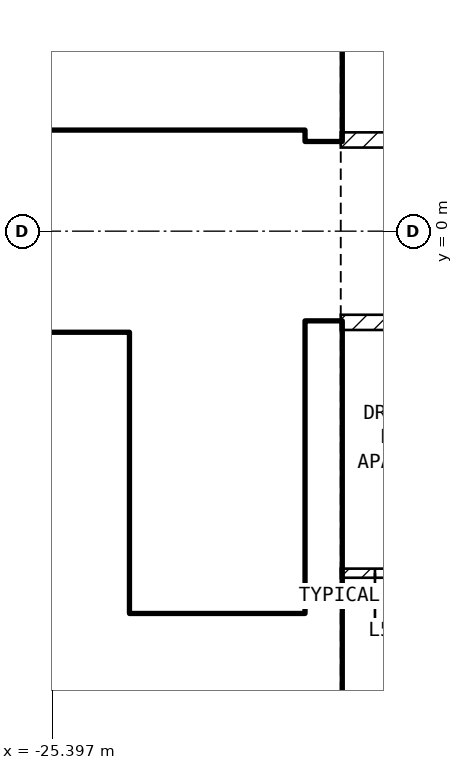
"""IFC4 building model, lengths in metres.
Left out: names, types, materials, properties, quantities, classifications, styles, units other than length and angle.
Written with IfcOpenShell. Run it as: python <this file> out.ifc"""

import sys

from ifc_helpers import new_model, si_unit, direction, frame, frame_2d, origin, place, context, subcontext, project, spatial, rectangle, extrude, element, fill, save


model = new_model("IFC4")
c1 = context("Model", 3, precision=1e-05, world=origin(), true_north=direction((0.0, 1.0)))
c2 = subcontext(c1, "Body", "Model", "MODEL_VIEW")
j1 = project(units=[si_unit("LENGTHUNIT", "METRE"), si_unit("PLANEANGLEUNIT", "RADIAN")], contexts=[c1])
p1 = place(None, origin())
s1 = spatial("IfcSite", under=j1, at=p1, CompositionType="ELEMENT")
p2 = place(p1, origin())
s2 = spatial("IfcBuilding", under=s1, at=p2, CompositionType="ELEMENT")
p3 = place(p2, frame((0.0, 0.0, 219.1)))
s3 = spatial("IfcBuildingStorey", under=s2, at=p3, CompositionType="ELEMENT", Elevation=219.1)
for number, where, z_axis, x_axis in (
    (1, (-21.825, -8.1, 0.0), (0.0, 0.0, 1.0), (0.0, 1.0, 0.0)),
    (2, (-21.825, 1.2, 0.0), (0.0, 0.0, 1.0), (0.0, 1.0, 0.0)),
):
    element("IfcWall", number, at=place(p3, frame(where, z_axis=z_axis, x_axis=x_axis)), inside=s3, PredefinedType="SHEAR", context=c2, shape_type="SweptSolid", body=[
        extrude(rectangle(XDim=6.9, YDim=0.45, at=frame_2d((3.45, 0.0))), origin(), (0.0, 0.0, 1.0), 3.2),
    ])
p4 = place(p3, frame((-33.2, 1.45, 0.0), z_axis=(0.0, 0.0, 1.0), x_axis=(1.0, 0.0, 0.0)))
e3 = element("IfcWall", 3, at=p4, inside=s3, PredefinedType="SOLIDWALL", context=c2, shape_type="SweptSolid", body=[
    extrude(rectangle(XDim=11.15, YDim=0.2, at=frame_2d((5.575, 0.0))), origin(), (0.0, 0.0, 1.0), 3.2),
])
p5 = place(p4, frame((9.4, 0.0, 0.0)))
e4 = element("IfcOpeningElement", 4, at=p5, cuts=e3, PredefinedType="OPENING", context=c2, shape_type="SweptSolid", body=[
    extrude(rectangle(XDim=1.0, YDim=2.1, at=frame_2d((0.5, 1.05))), frame((0.0, 0.11, 0.0), z_axis=(0.0, -1.0, 0.0), x_axis=(1.0, 0.0, 0.0)), (0.0, 0.0, 1.0), 0.22),
])
p6 = place(p4, frame((6.9, 0.0, 0.0)))
e5 = element("IfcOpeningElement", 5, at=p6, cuts=e3, PredefinedType="OPENING", context=c2, shape_type="SweptSolid", body=[
    extrude(rectangle(XDim=1.0, YDim=2.1, at=frame_2d((0.5, 1.05))), frame((0.0, 0.11, 0.0), z_axis=(0.0, -1.0, 0.0), x_axis=(1.0, 0.0, 0.0)), (0.0, 0.0, 1.0), 0.22),
])
p7 = place(p4, frame((1.1, 0.0, 0.0)))
e6 = element("IfcOpeningElement", 6, at=p7, cuts=e3, PredefinedType="OPENING", context=c2, shape_type="SweptSolid", body=[
    extrude(rectangle(XDim=0.9, YDim=2.1, at=frame_2d((0.45, 1.05))), frame((0.0, 0.11, 0.0), z_axis=(0.0, -1.0, 0.0), x_axis=(1.0, 0.0, 0.0)), (0.0, 0.0, 1.0), 0.22),
])
p8 = place(p3, frame((-24.5, -5.05, 0.0), z_axis=(0.0, 0.0, 1.0), x_axis=(0.0, 1.0, 0.0)))
e7 = element("IfcWall", 7, at=p8, inside=s3, PredefinedType="SOLIDWALL", context=c2, shape_type="SweptSolid", body=[
    extrude(rectangle(XDim=3.7, YDim=0.2, at=frame_2d((1.85, 0.0))), origin(), (0.0, 0.0, 1.0), 3.2),
])
p9 = place(p8, frame((0.1, 0.0, 0.0)))
e8 = element("IfcOpeningElement", 8, at=p9, cuts=e7, PredefinedType="OPENING", context=c2, shape_type="SweptSolid", body=[
    extrude(rectangle(XDim=0.8, YDim=2.1, at=frame_2d((0.4, 1.05))), frame((0.0, 0.11, 0.0), z_axis=(0.0, -1.0, 0.0), x_axis=(1.0, 0.0, 0.0)), (0.0, 0.0, 1.0), 0.22),
])
p10 = place(p3, frame((-28.35, -5.15, 0.0), z_axis=(0.0, 0.0, 1.0), x_axis=(1.0, 0.0, 0.0)))
e9 = element("IfcWall", 9, at=p10, inside=s3, PredefinedType="SOLIDWALL", context=c2, shape_type="SweptSolid", body=[
    extrude(rectangle(XDim=6.3, YDim=0.2, at=frame_2d((3.15, 0.0))), origin(), (0.0, 0.0, 1.0), 3.2),
])
p11 = place(p10, frame((5.1, 0.0, 0.0)))
e10 = element("IfcOpeningElement", 10, at=p11, cuts=e9, PredefinedType="OPENING", context=c2, shape_type="SweptSolid", body=[
    extrude(rectangle(XDim=1.0, YDim=2.1, at=frame_2d((0.5, 1.05))), frame((0.0, 0.11, 0.0), z_axis=(0.0, -1.0, 0.0), x_axis=(1.0, 0.0, 0.0)), (0.0, 0.0, 1.0), 0.22),
])
p12 = place(p3, frame((-33.2, -1.45, 0.0), z_axis=(0.0, 0.0, 1.0), x_axis=(1.0, 0.0, 0.0)))
e11 = element("IfcWall", 11, at=p12, inside=s3, PredefinedType="SOLIDWALL", context=c2, shape_type="SweptSolid", body=[
    extrude(rectangle(XDim=8.6, YDim=0.2, at=frame_2d((4.3, 0.0))), origin(), (0.0, 0.0, 1.0), 3.2),
])
p13 = place(p12, frame((7.2, 0.0, 0.0)))
e12 = element("IfcOpeningElement", 12, at=p13, cuts=e11, PredefinedType="OPENING", context=c2, shape_type="SweptSolid", body=[
    extrude(rectangle(XDim=1.0, YDim=2.1, at=frame_2d((0.5, 1.05))), frame((0.0, 0.11, 0.0), z_axis=(0.0, -1.0, 0.0), x_axis=(1.0, 0.0, 0.0)), (0.0, 0.0, 1.0), 0.22),
])
p14 = place(p12, frame((5.2, 0.0, 0.0)))
e13 = element("IfcOpeningElement", 13, at=p14, cuts=e11, PredefinedType="OPENING", context=c2, shape_type="SweptSolid", body=[
    extrude(rectangle(XDim=1.0, YDim=2.1, at=frame_2d((0.5, 1.05))), frame((0.0, 0.11, 0.0), z_axis=(0.0, -1.0, 0.0), x_axis=(1.0, 0.0, 0.0)), (0.0, 0.0, 1.0), 0.22),
])
p15 = place(p12, frame((3.2, 0.0, 0.0)))
e14 = element("IfcOpeningElement", 14, at=p15, cuts=e11, PredefinedType="OPENING", context=c2, shape_type="SweptSolid", body=[
    extrude(rectangle(XDim=1.0, YDim=2.1, at=frame_2d((0.5, 1.05))), frame((0.0, 0.11, 0.0), z_axis=(0.0, -1.0, 0.0), x_axis=(1.0, 0.0, 0.0)), (0.0, 0.0, 1.0), 0.22),
])
p16 = place(p12, frame((0.85, 0.0, 0.0)))
e15 = element("IfcOpeningElement", 15, at=p16, cuts=e11, PredefinedType="OPENING", context=c2, shape_type="SweptSolid", body=[
    extrude(rectangle(XDim=0.9, YDim=2.1, at=frame_2d((0.45, 1.05))), frame((0.0, 0.11, 0.0), z_axis=(0.0, -1.0, 0.0), x_axis=(1.0, 0.0, 0.0)), (0.0, 0.0, 1.0), 0.22),
])
p17 = place(p3, frame((-33.2, -3.95, 0.0), z_axis=(0.0, 0.0, 1.0), x_axis=(1.0, 0.0, 0.0)))
e16 = element("IfcWall", 16, at=p17, inside=s3, PredefinedType="SOLIDWALL", context=c2, shape_type="SweptSolid", body=[
    extrude(rectangle(XDim=8.6, YDim=0.2, at=frame_2d((4.3, 0.0))), origin(), (0.0, 0.0, 1.0), 3.2),
])
p18 = place(p3, frame((-21.6, 1.2, 0.0), z_axis=(0.0, 0.0, 1.0), x_axis=(1.0, 0.0, 0.0)))
e17 = element("IfcWall", 17, at=p18, inside=s3, PredefinedType="PARTITIONING", context=c2, shape_type="SweptSolid", body=[
    extrude(rectangle(XDim=17.2, YDim=0.2, at=frame_2d((8.6, 0.0))), origin(), (0.0, 0.0, 1.0), 3.2),
])
p19 = place(p18, frame((6.1, 0.0, 0.0)))
e18 = element("IfcOpeningElement", 18, at=p19, cuts=e17, PredefinedType="OPENING", context=c2, shape_type="SweptSolid", body=[
    extrude(rectangle(XDim=1.0, YDim=2.1, at=frame_2d((0.5, 1.05))), frame((0.0, 0.11, 0.0), z_axis=(0.0, -1.0, 0.0), x_axis=(1.0, 0.0, 0.0)), (0.0, 0.0, 1.0), 0.22),
])
p20 = place(p3, frame((-4.4, -1.2, 0.0), z_axis=(0.0, 0.0, 1.0), x_axis=(-1.0, 0.0, 0.0)))
e19 = element("IfcWall", 19, at=p20, inside=s3, PredefinedType="PARTITIONING", context=c2, shape_type="SweptSolid", body=[
    extrude(rectangle(XDim=17.2, YDim=0.2, at=frame_2d((8.6, 0.0))), origin(), (0.0, 0.0, 1.0), 3.2),
])
p21 = place(p20, frame((5.9, 0.0, 0.0)))
e20 = element("IfcOpeningElement", 20, at=p21, cuts=e19, PredefinedType="OPENING", context=c2, shape_type="SweptSolid", body=[
    extrude(rectangle(XDim=1.0, YDim=2.1, at=frame_2d((0.5, 1.05))), frame((0.0, 0.11, 0.0), z_axis=(0.0, -1.0, 0.0), x_axis=(1.0, 0.0, 0.0)), (0.0, 0.0, 1.0), 0.22),
])
p22 = place(p3, frame((-19.8, -4.5, 0.0), z_axis=(0.0, 0.0, 1.0), x_axis=(-1.0, 0.0, 0.0)))
e21 = element("IfcWall", 21, at=p22, inside=s3, PredefinedType="PARTITIONING", context=c2, shape_type="SweptSolid", body=[
    extrude(rectangle(XDim=1.8, YDim=0.12, at=frame_2d((0.9, 0.0))), origin(), (0.0, 0.0, 1.0), 3.2),
])
p23 = place(p22, frame((0.45, 0.0, 0.0)))
e22 = element("IfcOpeningElement", 22, at=p23, cuts=e21, PredefinedType="OPENING", context=c2, shape_type="SweptSolid", body=[
    extrude(rectangle(XDim=0.9, YDim=2.1, at=frame_2d((0.45, 1.05))), frame((0.0, 0.07, 0.0), z_axis=(0.0, -1.0, 0.0), x_axis=(1.0, 0.0, 0.0)), (0.0, 0.0, 1.0), 0.14),
])
p24 = place(p13, origin())
e23 = element("IfcDoor", 23, at=p24, inside=s3, OperationType="DOUBLE_DOOR_SLIDING", PredefinedType="DOOR", context=c2, shape_type="SweptSolid", body=[
    extrude(rectangle(XDim=1.0, YDim=2.1, at=frame_2d((0.5, 1.05))), frame((0.0, 0.025, 0.0), z_axis=(0.0, -1.0, 0.0), x_axis=(1.0, 0.0, 0.0)), (0.0, 0.0, 1.0), 0.05),
])
fill(e12, e23)
p25 = place(p11, origin())
e24 = element("IfcDoor", 24, at=p25, inside=s3, OperationType="SINGLE_SWING_LEFT", PredefinedType="DOOR", context=c2, shape_type="SweptSolid", body=[
    extrude(rectangle(XDim=1.0, YDim=2.1, at=frame_2d((0.5, 1.05))), frame((0.0, 0.025, 0.0), z_axis=(0.0, -1.0, 0.0), x_axis=(1.0, 0.0, 0.0)), (0.0, 0.0, 1.0), 0.05),
])
fill(e10, e24)
p26 = place(p5, origin())
e25 = element("IfcDoor", 25, at=p26, inside=s3, OperationType="SINGLE_SWING_LEFT", PredefinedType="DOOR", context=c2, shape_type="SweptSolid", body=[
    extrude(rectangle(XDim=1.0, YDim=2.1, at=frame_2d((0.5, 1.05))), frame((0.0, 0.025, 0.0), z_axis=(0.0, -1.0, 0.0), x_axis=(1.0, 0.0, 0.0)), (0.0, 0.0, 1.0), 0.05),
])
fill(e4, e25)
p27 = place(p9, origin())
e26 = element("IfcDoor", 26, at=p27, inside=s3, OperationType="SINGLE_SWING_LEFT", PredefinedType="DOOR", context=c2, shape_type="SweptSolid", body=[
    extrude(rectangle(XDim=0.8, YDim=2.1, at=frame_2d((0.4, 1.05))), frame((0.0, 0.025, 0.0), z_axis=(0.0, -1.0, 0.0), x_axis=(1.0, 0.0, 0.0)), (0.0, 0.0, 1.0), 0.05),
])
fill(e8, e26)
p28 = place(p6, origin())
e27 = element("IfcDoor", 27, at=p28, inside=s3, OperationType="SINGLE_SWING_LEFT", PredefinedType="DOOR", context=c2, shape_type="SweptSolid", body=[
    extrude(rectangle(XDim=1.0, YDim=2.1, at=frame_2d((0.5, 1.05))), frame((0.0, 0.025, 0.0), z_axis=(0.0, -1.0, 0.0), x_axis=(1.0, 0.0, 0.0)), (0.0, 0.0, 1.0), 0.05),
])
fill(e5, e27)
p29 = place(p23, origin())
e28 = element("IfcDoor", 28, at=p29, inside=s3, OperationType="SINGLE_SWING_RIGHT", PredefinedType="DOOR", context=c2, shape_type="SweptSolid", body=[
    extrude(rectangle(XDim=0.9, YDim=2.1, at=frame_2d((0.45, 1.05))), frame((0.0, 0.025, 0.0), z_axis=(0.0, -1.0, 0.0), x_axis=(1.0, 0.0, 0.0)), (0.0, 0.0, 1.0), 0.05),
])
fill(e22, e28)
save(model, sys.argv[1])
